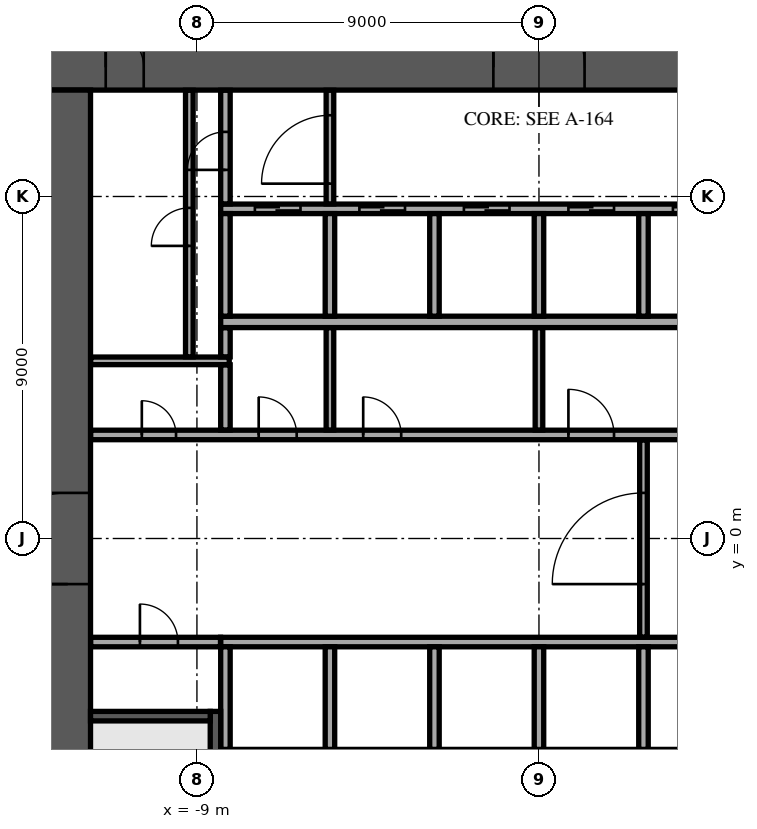
"""IFC4 building model, lengths in metres.
Left out: names, types, materials, properties, quantities, classifications, styles, units other than length and angle.
Written with IfcOpenShell. Run it as: python <this file> out.ifc"""

import sys

from ifc_helpers import new_model, si_unit, direction, frame, frame_2d, origin, place, context, subcontext, project, spatial, rectangle, extrude, element, fill, save


model = new_model("IFC4")
c1 = context("Model", 3, precision=1e-05, world=origin(), true_north=direction((0.0, 1.0)))
c2 = subcontext(c1, "Body", "Model", "MODEL_VIEW")
j1 = project(units=[si_unit("LENGTHUNIT", "METRE"), si_unit("PLANEANGLEUNIT", "RADIAN")], contexts=[c1])
p1 = place(None, origin())
s1 = spatial("IfcSite", under=j1, at=p1, CompositionType="ELEMENT")
p2 = place(p1, origin())
s2 = spatial("IfcBuilding", under=s1, at=p2, CompositionType="ELEMENT")
p3 = place(p2, frame((0.0, 0.0, 4.5)))
s3 = spatial("IfcBuildingStorey", under=s2, at=p3, CompositionType="ELEMENT", Elevation=4.5)
p4 = place(p3, frame((-13.0, 12.4, 0.0), z_axis=(0.0, 0.0, 1.0), x_axis=(1.0, 0.0, 0.0)))
e1 = element("IfcWall", 1, at=p4, inside=s3, PredefinedType="SHEAR", context=c2, shape_type="SweptSolid", body=[
    extrude(rectangle(XDim=26.0, YDim=1.2, at=frame_2d((13.0, 0.0))), origin(), (0.0, 0.0, 1.0), 4.1),
])
p5 = place(p4, frame((11.8, 0.0, 0.0)))
e2 = element("IfcOpeningElement", 2, at=p5, cuts=e1, PredefinedType="OPENING", context=c2, shape_type="SweptSolid", body=[
    extrude(rectangle(XDim=2.4, YDim=2.4, at=frame_2d((1.2, 1.2))), frame((0.0, 0.61, 0.0), z_axis=(0.0, -1.0, 0.0), x_axis=(1.0, 0.0, 0.0)), (0.0, 0.0, 1.0), 1.22),
])
p6 = place(p4, frame((22.625, 0.0, 0.0)))
e3 = element("IfcOpeningElement", 3, at=p6, cuts=e1, PredefinedType="OPENING", context=c2, shape_type="SweptSolid", body=[
    extrude(rectangle(XDim=1.2, YDim=2.1, at=frame_2d((0.6, 1.05))), frame((0.0, 0.61, 0.0), z_axis=(0.0, -1.0, 0.0), x_axis=(1.0, 0.0, 0.0)), (0.0, 0.0, 1.0), 1.22),
])
p7 = place(p4, frame((1.6, 0.0, 0.0)))
e4 = element("IfcOpeningElement", 4, at=p7, cuts=e1, PredefinedType="OPENING", context=c2, shape_type="SweptSolid", body=[
    extrude(rectangle(XDim=1.0, YDim=2.1, at=frame_2d((0.5, 1.05))), frame((0.0, 0.61, 0.0), z_axis=(0.0, -1.0, 0.0), x_axis=(1.0, 0.0, 0.0)), (0.0, 0.0, 1.0), 1.22),
])
p8 = place(p3, frame((-12.4, -11.8, 0.0), z_axis=(0.0, 0.0, 1.0), x_axis=(0.0, 1.0, 0.0)))
e5 = element("IfcWall", 5, at=p8, inside=s3, PredefinedType="SHEAR", context=c2, shape_type="SweptSolid", body=[
    extrude(rectangle(XDim=23.6, YDim=1.2, at=frame_2d((11.8, 0.0))), origin(), (0.0, 0.0, 1.0), 4.1),
])
p9 = place(p8, frame((10.6, 0.0, 0.0)))
e6 = element("IfcOpeningElement", 6, at=p9, cuts=e5, PredefinedType="OPENING", context=c2, shape_type="SweptSolid", body=[
    extrude(rectangle(XDim=2.4, YDim=2.4, at=frame_2d((1.2, 1.2))), frame((0.0, 0.61, 0.0), z_axis=(0.0, -1.0, 0.0), x_axis=(1.0, 0.0, 0.0)), (0.0, 0.0, 1.0), 1.22),
])
for number, where, z_axis, x_axis in (
    (7, (-8.375, 5.7, 0.0), (0.0, 0.0, 1.0), (1.0, 0.0, 0.0)),
    (8, (-8.375, -5.7, 0.0), (0.0, 0.0, 1.0), (1.0, 0.0, 0.0)),
):
    element("IfcWall", number, at=place(p3, frame(where, z_axis=z_axis, x_axis=x_axis)), inside=s3, PredefinedType="SOLIDWALL", context=c2, shape_type="SweptSolid", body=[
        extrude(rectangle(XDim=16.75, YDim=0.3, at=frame_2d((8.375, 0.0))), origin(), (0.0, 0.0, 1.0), 4.1),
    ])
p10 = place(p3, frame((-8.375, 8.675, 0.0), z_axis=(0.0, 0.0, 1.0), x_axis=(1.0, 0.0, 0.0)))
e9 = element("IfcWall", 9, at=p10, inside=s3, PredefinedType="SOLIDWALL", context=c2, shape_type="SweptSolid", body=[
    extrude(rectangle(XDim=16.75, YDim=0.25, at=frame_2d((8.375, 0.0))), origin(), (0.0, 0.0, 1.0), 4.1),
])
p11 = place(p10, frame((0.9, 0.0, 0.0)))
e10 = element("IfcOpeningElement", 10, at=p11, cuts=e9, PredefinedType="OPENING", context=c2, shape_type="SweptSolid", body=[
    extrude(rectangle(XDim=1.2, YDim=2.1, at=frame_2d((0.6, 1.05))), frame((0.0, 0.135, 0.0), z_axis=(0.0, -1.0, 0.0), x_axis=(1.0, 0.0, 0.0)), (0.0, 0.0, 1.0), 0.27),
])
p12 = place(p10, frame((3.65, 0.0, 0.0)))
e11 = element("IfcOpeningElement", 11, at=p12, cuts=e9, PredefinedType="OPENING", context=c2, shape_type="SweptSolid", body=[
    extrude(rectangle(XDim=1.2, YDim=2.1, at=frame_2d((0.6, 1.05))), frame((0.0, 0.135, 0.0), z_axis=(0.0, -1.0, 0.0), x_axis=(1.0, 0.0, 0.0)), (0.0, 0.0, 1.0), 0.27),
])
p13 = place(p10, frame((6.4, 0.0, 0.0)))
e12 = element("IfcOpeningElement", 12, at=p13, cuts=e9, PredefinedType="OPENING", context=c2, shape_type="SweptSolid", body=[
    extrude(rectangle(XDim=1.2, YDim=2.1, at=frame_2d((0.6, 1.05))), frame((0.0, 0.135, 0.0), z_axis=(0.0, -1.0, 0.0), x_axis=(1.0, 0.0, 0.0)), (0.0, 0.0, 1.0), 0.27),
])
p14 = place(p10, frame((9.15, 0.0, 0.0)))
e13 = element("IfcOpeningElement", 13, at=p14, cuts=e9, PredefinedType="OPENING", context=c2, shape_type="SweptSolid", body=[
    extrude(rectangle(XDim=1.2, YDim=2.1, at=frame_2d((0.6, 1.05))), frame((0.0, 0.135, 0.0), z_axis=(0.0, -1.0, 0.0), x_axis=(1.0, 0.0, 0.0)), (0.0, 0.0, 1.0), 0.27),
])
p15 = place(p10, frame((11.9, 0.0, 0.0)))
e14 = element("IfcOpeningElement", 14, at=p15, cuts=e9, PredefinedType="OPENING", context=c2, shape_type="SweptSolid", body=[
    extrude(rectangle(XDim=1.2, YDim=2.1, at=frame_2d((0.6, 1.05))), frame((0.0, 0.135, 0.0), z_axis=(0.0, -1.0, 0.0), x_axis=(1.0, 0.0, 0.0)), (0.0, 0.0, 1.0), 0.27),
])
p16 = place(p10, frame((14.65, 0.0, 0.0)))
e15 = element("IfcOpeningElement", 15, at=p16, cuts=e9, PredefinedType="OPENING", context=c2, shape_type="SweptSolid", body=[
    extrude(rectangle(XDim=1.2, YDim=2.1, at=frame_2d((0.6, 1.05))), frame((0.0, 0.135, 0.0), z_axis=(0.0, -1.0, 0.0), x_axis=(1.0, 0.0, 0.0)), (0.0, 0.0, 1.0), 0.27),
])
for number, where, z_axis, x_axis in (
    (16, (-8.25, 5.85, 0.0), (0.0, 0.0, 1.0), (0.0, 1.0, 0.0)),
    (17, (-5.5, 5.85, 0.0), (0.0, 0.0, 1.0), (0.0, 1.0, 0.0)),
    (18, (-2.75, 5.85, 0.0), (0.0, 0.0, 1.0), (0.0, 1.0, 0.0)),
    (19, (0.0, 5.85, 0.0), (0.0, 0.0, 1.0), (0.0, 1.0, 0.0)),
    (20, (2.75, 5.85, 0.0), (0.0, 0.0, 1.0), (0.0, 1.0, 0.0)),
):
    element("IfcWall", number, at=place(p3, frame(where, z_axis=z_axis, x_axis=x_axis)), inside=s3, PredefinedType="SOLIDWALL", context=c2, shape_type="SweptSolid", body=[
        extrude(rectangle(XDim=2.7, YDim=0.25, at=frame_2d((1.35, 0.0))), origin(), (0.0, 0.0, 1.0), 4.1),
    ])
p17 = place(p3, frame((-8.375, -2.725, 0.0), z_axis=(0.0, 0.0, 1.0), x_axis=(1.0, 0.0, 0.0)))
e21 = element("IfcWall", 21, at=p17, inside=s3, PredefinedType="SOLIDWALL", context=c2, shape_type="SweptSolid", body=[
    extrude(rectangle(XDim=14.0, YDim=0.25, at=frame_2d((7.0, 0.0))), origin(), (0.0, 0.0, 1.0), 4.1),
])
for number, where, z_axis, x_axis in (
    (22, (-8.25, -5.55, 0.0), (0.0, 0.0, 1.0), (0.0, 1.0, 0.0)),
    (23, (-5.5, -5.55, 0.0), (0.0, 0.0, 1.0), (0.0, 1.0, 0.0)),
    (24, (-2.75, -5.55, 0.0), (0.0, 0.0, 1.0), (0.0, 1.0, 0.0)),
    (25, (0.0, -5.55, 0.0), (0.0, 0.0, 1.0), (0.0, 1.0, 0.0)),
    (26, (2.75, -5.55, 0.0), (0.0, 0.0, 1.0), (0.0, 1.0, 0.0)),
):
    element("IfcWall", number, at=place(p3, frame(where, z_axis=z_axis, x_axis=x_axis)), inside=s3, PredefinedType="SOLIDWALL", context=c2, shape_type="SweptSolid", body=[
        extrude(rectangle(XDim=2.7, YDim=0.25, at=frame_2d((1.35, 0.0))), origin(), (0.0, 0.0, 1.0), 4.1),
    ])
p18 = place(p3, frame((-8.512, -4.55, 0.0), z_axis=(0.0, 0.0, 1.0), x_axis=(0.0, -1.0, 0.0)))
e27 = element("IfcWall", 27, at=p18, inside=s3, PredefinedType="SOLIDWALL", context=c2, shape_type="SweptSolid", body=[
    extrude(rectangle(XDim=7.25, YDim=0.275, at=frame_2d((3.625, 0.0))), origin(), (0.0, 0.0, 1.0), 4.1),
])
p19 = place(p18, frame((6.0, 0.0, 0.0)))
e28 = element("IfcOpeningElement", 28, at=p19, cuts=e27, PredefinedType="OPENING", context=c2, shape_type="SweptSolid", body=[
    extrude(rectangle(XDim=1.0, YDim=2.1, at=frame_2d((0.5, 1.05))), frame((0.0, 0.147, 0.0), z_axis=(0.0, -1.0, 0.0), x_axis=(1.0, 0.0, 0.0)), (0.0, 0.0, 1.0), 0.295),
])
p20 = place(p3, frame((-8.65, -4.675, 0.0), z_axis=(0.0, 0.0, 1.0), x_axis=(-1.0, 0.0, 0.0)))
e29 = element("IfcWall", 29, at=p20, inside=s3, PredefinedType="SOLIDWALL", context=c2, shape_type="SweptSolid", body=[
    extrude(rectangle(XDim=3.15, YDim=0.25, at=frame_2d((1.575, 0.0))), origin(), (0.0, 0.0, 1.0), 4.1),
])
p21 = place(p3, frame((-11.795, -2.725, 0.0), z_axis=(0.0, 0.0, 1.0), x_axis=(1.0, 0.0, 0.0)))
e30 = element("IfcWall", 30, at=p21, inside=s3, PredefinedType="PARTITIONING", context=c2, shape_type="SweptSolid", body=[
    extrude(rectangle(XDim=3.415, YDim=0.25, at=frame_2d((1.708, 0.0))), origin(), (0.0, 0.0, 1.0), 4.1),
])
p22 = place(p21, frame((1.295, 0.0, 0.0)))
e31 = element("IfcOpeningElement", 31, at=p22, cuts=e30, PredefinedType="OPENING", context=c2, shape_type="SweptSolid", body=[
    extrude(rectangle(XDim=1.0, YDim=2.1, at=frame_2d((0.5, 1.05))), frame((0.0, 0.135, 0.0), z_axis=(0.0, -1.0, 0.0), x_axis=(1.0, 0.0, 0.0)), (0.0, 0.0, 1.0), 0.27),
])
p23 = place(p3, frame((2.75, -2.595, 0.0), z_axis=(0.0, 0.0, 1.0), x_axis=(0.0, 1.0, 0.0)))
e32 = element("IfcWall", 32, at=p23, inside=s3, PredefinedType="PARTITIONING", context=c2, shape_type="SweptSolid", body=[
    extrude(rectangle(XDim=5.19, YDim=0.2, at=frame_2d((2.595, 0.0))), origin(), (0.0, 0.0, 1.0), 4.1),
])
p24 = place(p23, frame((1.395, 0.0, 0.0)))
e33 = element("IfcOpeningElement", 33, at=p24, cuts=e32, PredefinedType="OPENING", context=c2, shape_type="SweptSolid", body=[
    extrude(rectangle(XDim=2.4, YDim=2.4, at=frame_2d((1.2, 1.2))), frame((0.0, 0.11, 0.0), z_axis=(0.0, -1.0, 0.0), x_axis=(1.0, 0.0, 0.0)), (0.0, 0.0, 1.0), 0.22),
])
p25 = place(p3, frame((-11.795, 2.725, 0.0), z_axis=(0.0, 0.0, 1.0), x_axis=(1.0, 0.0, 0.0)))
e34 = element("IfcWall", 34, at=p25, inside=s3, PredefinedType="PARTITIONING", context=c2, shape_type="SweptSolid", body=[
    extrude(rectangle(XDim=23.59, YDim=0.25, at=frame_2d((11.795, 0.0))), origin(), (0.0, 0.0, 1.0), 4.1),
])
p26 = place(p25, frame((21.345, 0.0, 0.0)))
e35 = element("IfcOpeningElement", 35, at=p26, cuts=e34, PredefinedType="OPENING", context=c2, shape_type="SweptSolid", body=[
    extrude(rectangle(XDim=0.9, YDim=2.1, at=frame_2d((0.45, 1.05))), frame((0.0, 0.135, 0.0), z_axis=(0.0, -1.0, 0.0), x_axis=(1.0, 0.0, 0.0)), (0.0, 0.0, 1.0), 0.27),
])
p27 = place(p25, frame((1.345, 0.0, 0.0)))
e36 = element("IfcOpeningElement", 36, at=p27, cuts=e34, PredefinedType="OPENING", context=c2, shape_type="SweptSolid", body=[
    extrude(rectangle(XDim=0.9, YDim=2.1, at=frame_2d((0.45, 1.05))), frame((0.0, 0.135, 0.0), z_axis=(0.0, -1.0, 0.0), x_axis=(1.0, 0.0, 0.0)), (0.0, 0.0, 1.0), 0.27),
])
p28 = place(p25, frame((4.42, 0.0, 0.0)))
e37 = element("IfcOpeningElement", 37, at=p28, cuts=e34, PredefinedType="OPENING", context=c2, shape_type="SweptSolid", body=[
    extrude(rectangle(XDim=1.0, YDim=2.1, at=frame_2d((0.5, 1.05))), frame((0.0, 0.135, 0.0), z_axis=(0.0, -1.0, 0.0), x_axis=(1.0, 0.0, 0.0)), (0.0, 0.0, 1.0), 0.27),
])
p29 = place(p25, frame((7.17, 0.0, 0.0)))
e38 = element("IfcOpeningElement", 38, at=p29, cuts=e34, PredefinedType="OPENING", context=c2, shape_type="SweptSolid", body=[
    extrude(rectangle(XDim=1.0, YDim=2.1, at=frame_2d((0.5, 1.05))), frame((0.0, 0.135, 0.0), z_axis=(0.0, -1.0, 0.0), x_axis=(1.0, 0.0, 0.0)), (0.0, 0.0, 1.0), 0.27),
])
p30 = place(p25, frame((12.57, 0.0, 0.0)))
e39 = element("IfcOpeningElement", 39, at=p30, cuts=e34, PredefinedType="OPENING", context=c2, shape_type="SweptSolid", body=[
    extrude(rectangle(XDim=1.2, YDim=2.1, at=frame_2d((0.6, 1.05))), frame((0.0, 0.135, 0.0), z_axis=(0.0, -1.0, 0.0), x_axis=(1.0, 0.0, 0.0)), (0.0, 0.0, 1.0), 0.27),
])
p31 = place(p3, frame((-8.25, 2.855, 0.0), z_axis=(0.0, 0.0, 1.0), x_axis=(0.0, 1.0, 0.0)))
e40 = element("IfcWall", 40, at=p31, inside=s3, PredefinedType="PARTITIONING", context=c2, shape_type="SweptSolid", body=[
    extrude(rectangle(XDim=1.715, YDim=0.25, at=frame_2d((0.857, 0.0))), origin(), (0.0, 0.0, 1.0), 4.1),
])
for number, where, z_axis, x_axis in (
    (41, (-5.5, 2.855, 0.0), (0.0, 0.0, 1.0), (0.0, 1.0, 0.0)),
    (42, (0.0, 2.855, 0.0), (0.0, 0.0, 1.0), (0.0, 1.0, 0.0)),
):
    element("IfcWall", number, at=place(p3, frame(where, z_axis=z_axis, x_axis=x_axis)), inside=s3, PredefinedType="PARTITIONING", context=c2, shape_type="SweptSolid", body=[
        extrude(rectangle(XDim=2.69, YDim=0.2, at=frame_2d((1.345, 0.0))), origin(), (0.0, 0.0, 1.0), 4.1),
    ])
p32 = place(p3, frame((-11.795, 4.675, 0.0), z_axis=(0.0, 0.0, 1.0), x_axis=(1.0, 0.0, 0.0)))
e43 = element("IfcWall", 43, at=p32, inside=s3, PredefinedType="PARTITIONING", context=c2, shape_type="SweptSolid", body=[
    extrude(rectangle(XDim=3.645, YDim=0.2, at=frame_2d((1.823, 0.0))), origin(), (0.0, 0.0, 1.0), 4.1),
])
p33 = place(p3, frame((-9.2, 4.78, 0.0), z_axis=(0.0, 0.0, 1.0), x_axis=(0.0, 1.0, 0.0)))
e44 = element("IfcWall", 44, at=p33, inside=s3, PredefinedType="PARTITIONING", context=c2, shape_type="SweptSolid", body=[
    extrude(rectangle(XDim=7.015, YDim=0.2, at=frame_2d((3.507, 0.0))), origin(), (0.0, 0.0, 1.0), 4.1),
])
p34 = place(p33, frame((2.92, 0.0, 0.0)))
e45 = element("IfcOpeningElement", 45, at=p34, cuts=e44, PredefinedType="OPENING", context=c2, shape_type="SweptSolid", body=[
    extrude(rectangle(XDim=1.0, YDim=2.1, at=frame_2d((0.5, 1.05))), frame((0.0, 0.11, 0.0), z_axis=(0.0, -1.0, 0.0), x_axis=(1.0, 0.0, 0.0)), (0.0, 0.0, 1.0), 0.22),
])
p35 = place(p3, frame((-8.25, 4.78, 0.0), z_axis=(0.0, 0.0, 1.0), x_axis=(0.0, 1.0, 0.0)))
e46 = element("IfcWall", 46, at=p35, inside=s3, PredefinedType="PARTITIONING", context=c2, shape_type="SweptSolid", body=[
    extrude(rectangle(XDim=0.765, YDim=0.25, at=frame_2d((0.382, 0.0))), origin(), (0.0, 0.0, 1.0), 4.1),
])
p36 = place(p3, frame((-8.25, 8.805, 0.0), z_axis=(0.0, 0.0, 1.0), x_axis=(0.0, 1.0, 0.0)))
e47 = element("IfcWall", 47, at=p36, inside=s3, PredefinedType="PARTITIONING", context=c2, shape_type="SweptSolid", body=[
    extrude(rectangle(XDim=2.99, YDim=0.25, at=frame_2d((1.495, 0.0))), origin(), (0.0, 0.0, 1.0), 4.1),
])
p37 = place(p36, frame((0.895, 0.0, 0.0)))
e48 = element("IfcOpeningElement", 48, at=p37, cuts=e47, PredefinedType="OPENING", context=c2, shape_type="SweptSolid", body=[
    extrude(rectangle(XDim=1.0, YDim=2.1, at=frame_2d((0.5, 1.05))), frame((0.0, 0.135, 0.0), z_axis=(0.0, -1.0, 0.0), x_axis=(1.0, 0.0, 0.0)), (0.0, 0.0, 1.0), 0.27),
])
p38 = place(p3, frame((-5.5, 8.805, 0.0), z_axis=(0.0, 0.0, 1.0), x_axis=(0.0, 1.0, 0.0)))
e49 = element("IfcWall", 49, at=p38, inside=s3, PredefinedType="PARTITIONING", context=c2, shape_type="SweptSolid", body=[
    extrude(rectangle(XDim=2.99, YDim=0.2, at=frame_2d((1.495, 0.0))), origin(), (0.0, 0.0, 1.0), 4.1),
])
p39 = place(p38, frame((0.532, 0.0, 0.0)))
e50 = element("IfcOpeningElement", 50, at=p39, cuts=e49, PredefinedType="OPENING", context=c2, shape_type="SweptSolid", body=[
    extrude(rectangle(XDim=1.8, YDim=2.1, at=frame_2d((0.9, 1.05))), frame((0.0, 0.11, 0.0), z_axis=(0.0, -1.0, 0.0), x_axis=(1.0, 0.0, 0.0)), (0.0, 0.0, 1.0), 0.22),
])
p40 = place(p5, origin())
e51 = element("IfcDoor", 51, at=p40, inside=s3, OperationType="SINGLE_SWING_LEFT", PredefinedType="DOOR", context=c2, shape_type="SweptSolid", body=[
    extrude(rectangle(XDim=2.4, YDim=2.4, at=frame_2d((1.2, 1.2))), frame((0.0, 0.025, 0.0), z_axis=(0.0, -1.0, 0.0), x_axis=(1.0, 0.0, 0.0)), (0.0, 0.0, 1.0), 0.05),
])
fill(e2, e51)
p41 = place(p7, origin())
e52 = element("IfcDoor", 52, at=p41, inside=s3, OperationType="SINGLE_SWING_LEFT", PredefinedType="DOOR", context=c2, shape_type="SweptSolid", body=[
    extrude(rectangle(XDim=1.0, YDim=2.1, at=frame_2d((0.5, 1.05))), frame((0.0, 0.025, 0.0), z_axis=(0.0, -1.0, 0.0), x_axis=(1.0, 0.0, 0.0)), (0.0, 0.0, 1.0), 0.05),
])
fill(e4, e52)
p42 = place(p9, origin())
e53 = element("IfcDoor", 53, at=p42, inside=s3, OperationType="SINGLE_SWING_LEFT", PredefinedType="DOOR", context=c2, shape_type="SweptSolid", body=[
    extrude(rectangle(XDim=2.4, YDim=2.4, at=frame_2d((1.2, 1.2))), frame((0.0, 0.025, 0.0), z_axis=(0.0, -1.0, 0.0), x_axis=(1.0, 0.0, 0.0)), (0.0, 0.0, 1.0), 0.05),
])
fill(e6, e53)
p43 = place(p11, origin())
e54 = element("IfcDoor", 54, at=p43, inside=s3, OperationType="DOUBLE_DOOR_SLIDING", PredefinedType="DOOR", context=c2, shape_type="SweptSolid", body=[
    extrude(rectangle(XDim=1.2, YDim=2.1, at=frame_2d((0.6, 1.05))), frame((0.0, 0.025, 0.0), z_axis=(0.0, -1.0, 0.0), x_axis=(1.0, 0.0, 0.0)), (0.0, 0.0, 1.0), 0.05),
])
fill(e10, e54)
p44 = place(p12, origin())
e55 = element("IfcDoor", 55, at=p44, inside=s3, OperationType="DOUBLE_DOOR_SLIDING", PredefinedType="DOOR", context=c2, shape_type="SweptSolid", body=[
    extrude(rectangle(XDim=1.2, YDim=2.1, at=frame_2d((0.6, 1.05))), frame((0.0, 0.025, 0.0), z_axis=(0.0, -1.0, 0.0), x_axis=(1.0, 0.0, 0.0)), (0.0, 0.0, 1.0), 0.05),
])
fill(e11, e55)
p45 = place(p13, origin())
e56 = element("IfcDoor", 56, at=p45, inside=s3, OperationType="DOUBLE_DOOR_SLIDING", PredefinedType="DOOR", context=c2, shape_type="SweptSolid", body=[
    extrude(rectangle(XDim=1.2, YDim=2.1, at=frame_2d((0.6, 1.05))), frame((0.0, 0.025, 0.0), z_axis=(0.0, -1.0, 0.0), x_axis=(1.0, 0.0, 0.0)), (0.0, 0.0, 1.0), 0.05),
])
fill(e12, e56)
p46 = place(p14, origin())
e57 = element("IfcDoor", 57, at=p46, inside=s3, OperationType="DOUBLE_DOOR_SLIDING", PredefinedType="DOOR", context=c2, shape_type="SweptSolid", body=[
    extrude(rectangle(XDim=1.2, YDim=2.1, at=frame_2d((0.6, 1.05))), frame((0.0, 0.025, 0.0), z_axis=(0.0, -1.0, 0.0), x_axis=(1.0, 0.0, 0.0)), (0.0, 0.0, 1.0), 0.05),
])
fill(e13, e57)
p47 = place(p15, origin())
e58 = element("IfcDoor", 58, at=p47, inside=s3, OperationType="DOUBLE_DOOR_SLIDING", PredefinedType="DOOR", context=c2, shape_type="SweptSolid", body=[
    extrude(rectangle(XDim=1.2, YDim=2.1, at=frame_2d((0.6, 1.05))), frame((0.0, 0.025, 0.0), z_axis=(0.0, -1.0, 0.0), x_axis=(1.0, 0.0, 0.0)), (0.0, 0.0, 1.0), 0.05),
])
fill(e14, e58)
p48 = place(p22, origin())
e59 = element("IfcDoor", 59, at=p48, inside=s3, OperationType="SINGLE_SWING_RIGHT", PredefinedType="DOOR", context=c2, shape_type="SweptSolid", body=[
    extrude(rectangle(XDim=1.0, YDim=2.1, at=frame_2d((0.5, 1.05))), frame((0.0, 0.025, 0.0), z_axis=(0.0, -1.0, 0.0), x_axis=(1.0, 0.0, 0.0)), (0.0, 0.0, 1.0), 0.05),
])
fill(e31, e59)
p49 = place(p27, origin())
e60 = element("IfcDoor", 60, at=p49, inside=s3, OperationType="SINGLE_SWING_RIGHT", PredefinedType="DOOR", context=c2, shape_type="SweptSolid", body=[
    extrude(rectangle(XDim=0.9, YDim=2.1, at=frame_2d((0.45, 1.05))), frame((0.0, 0.025, 0.0), z_axis=(0.0, -1.0, 0.0), x_axis=(1.0, 0.0, 0.0)), (0.0, 0.0, 1.0), 0.05),
])
fill(e36, e60)
p50 = place(p34, origin())
e61 = element("IfcDoor", 61, at=p50, inside=s3, OperationType="SINGLE_SWING_RIGHT", PredefinedType="DOOR", context=c2, shape_type="SweptSolid", body=[
    extrude(rectangle(XDim=1.0, YDim=2.1, at=frame_2d((0.5, 1.05))), frame((0.0, 0.025, 0.0), z_axis=(0.0, -1.0, 0.0), x_axis=(1.0, 0.0, 0.0)), (0.0, 0.0, 1.0), 0.05),
])
fill(e45, e61)
p51 = place(p37, origin())
e62 = element("IfcDoor", 62, at=p51, inside=s3, OperationType="SINGLE_SWING_RIGHT", PredefinedType="DOOR", context=c2, shape_type="SweptSolid", body=[
    extrude(rectangle(XDim=1.0, YDim=2.1, at=frame_2d((0.5, 1.05))), frame((0.0, 0.025, 0.0), z_axis=(0.0, -1.0, 0.0), x_axis=(1.0, 0.0, 0.0)), (0.0, 0.0, 1.0), 0.05),
])
fill(e48, e62)
p52 = place(p28, origin())
e63 = element("IfcDoor", 63, at=p52, inside=s3, OperationType="SINGLE_SWING_RIGHT", PredefinedType="DOOR", context=c2, shape_type="SweptSolid", body=[
    extrude(rectangle(XDim=1.0, YDim=2.1, at=frame_2d((0.5, 1.05))), frame((0.0, 0.025, 0.0), z_axis=(0.0, -1.0, 0.0), x_axis=(1.0, 0.0, 0.0)), (0.0, 0.0, 1.0), 0.05),
])
fill(e37, e63)
p53 = place(p29, origin())
e64 = element("IfcDoor", 64, at=p53, inside=s3, OperationType="SINGLE_SWING_RIGHT", PredefinedType="DOOR", context=c2, shape_type="SweptSolid", body=[
    extrude(rectangle(XDim=1.0, YDim=2.1, at=frame_2d((0.5, 1.05))), frame((0.0, 0.025, 0.0), z_axis=(0.0, -1.0, 0.0), x_axis=(1.0, 0.0, 0.0)), (0.0, 0.0, 1.0), 0.05),
])
fill(e38, e64)
p54 = place(p30, origin())
e65 = element("IfcDoor", 65, at=p54, inside=s3, OperationType="SINGLE_SWING_LEFT", PredefinedType="DOOR", context=c2, shape_type="SweptSolid", body=[
    extrude(rectangle(XDim=1.2, YDim=2.1, at=frame_2d((0.6, 1.05))), frame((0.0, 0.025, 0.0), z_axis=(0.0, -1.0, 0.0), x_axis=(1.0, 0.0, 0.0)), (0.0, 0.0, 1.0), 0.05),
])
fill(e39, e65)
p55 = place(p24, origin())
e66 = element("IfcDoor", 66, at=p55, inside=s3, OperationType="DOUBLE_DOOR_DOUBLE_SWING", PredefinedType="DOOR", context=c2, shape_type="SweptSolid", body=[
    extrude(rectangle(XDim=2.4, YDim=2.4, at=frame_2d((1.2, 1.2))), frame((0.0, 0.025, 0.0), z_axis=(0.0, -1.0, 0.0), x_axis=(1.0, 0.0, 0.0)), (0.0, 0.0, 1.0), 0.05),
])
fill(e33, e66)
p56 = place(p39, origin())
e67 = element("IfcDoor", 67, at=p56, inside=s3, OperationType="SINGLE_SWING_LEFT", PredefinedType="DOOR", context=c2, shape_type="SweptSolid", body=[
    extrude(rectangle(XDim=1.8, YDim=2.1, at=frame_2d((0.9, 1.05))), frame((0.0, 0.025, 0.0), z_axis=(0.0, -1.0, 0.0), x_axis=(1.0, 0.0, 0.0)), (0.0, 0.0, 1.0), 0.05),
])
fill(e50, e67)
save(model, sys.argv[1])
